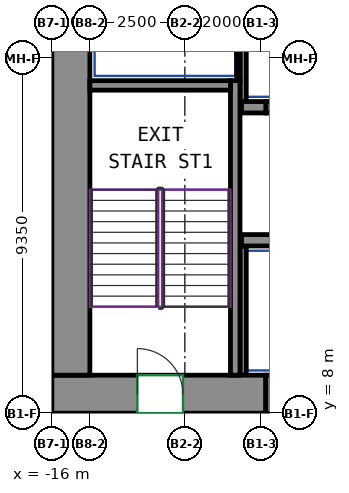
"""IFC4 building model, lengths in metres.
Left out: names, types, materials, properties, quantities, classifications, styles, units other than length and angle.
Written with IfcOpenShell. Run it as: python <this file> out.ifc"""

import sys

from ifc_helpers import new_model, si_unit, direction, frame, frame_2d, origin, place, context, subcontext, project, spatial, rectangle, extrude, source, transform, mapped, element, fill, save


model = new_model("IFC4")
c1 = context("Model", 3, precision=1e-05, world=origin(), true_north=direction((0.0, 1.0)))
c2 = subcontext(c1, "Body", "Model", "MODEL_VIEW")
j1 = project(units=[si_unit("LENGTHUNIT", "METRE"), si_unit("PLANEANGLEUNIT", "RADIAN")], contexts=[c1])
p1 = place(None, origin())
s1 = spatial("IfcSite", under=j1, at=p1, CompositionType="ELEMENT")
p2 = place(p1, origin())
s2 = spatial("IfcBuilding", under=s1, at=p2, CompositionType="ELEMENT")
p3 = place(p2, frame((0.0, 0.0, 75.2)))
s3 = spatial("IfcBuildingStorey", under=s2, at=p3, CompositionType="ELEMENT", Elevation=75.2)
m1 = source(origin(), c2, "Body", "SweptSolid", [
    extrude(rectangle(XDim=5.63, YDim=1.0, at=frame_2d((2.815, 0.0))), origin(), (0.0, 0.0, 1.0), 3.72),
])
p4 = place(p3, frame((-16.0, 8.5, 0.0), z_axis=(0.0, 0.0, 1.0), x_axis=(1.0, 0.0, 0.0)))
e1 = element("IfcWall", 1, at=p4, inside=s3, PredefinedType="SHEAR", context=c2, shape_type="MappedRepresentation", body=[
    mapped(m1, transform((0.0, 0.0, 0.0))),
])
p5 = place(p4, frame((2.25, 0.0, 0.0)))
e2 = element("IfcOpeningElement", 2, at=p5, cuts=e1, PredefinedType="OPENING", context=c2, shape_type="SweptSolid", body=[
    extrude(rectangle(XDim=1.2, YDim=2.1, at=frame_2d((0.6, 1.05))), frame((0.0, 0.51, 0.0), z_axis=(0.0, -1.0, 0.0), x_axis=(1.0, 0.0, 0.0)), (0.0, 0.0, 1.0), 1.02),
])
m2 = source(origin(), c2, "Body", "SweptSolid", [
    extrude(rectangle(XDim=12.0, YDim=1.0, at=frame_2d((6.0, 0.0))), origin(), (0.0, 0.0, 1.0), 3.72),
])
p6 = place(p3, frame((-15.5, 9.0, 0.0), z_axis=(0.0, 0.0, 1.0), x_axis=(0.0, 1.0, 0.0)))
e3 = element("IfcWall", 3, at=p6, inside=s3, PredefinedType="SHEAR", context=c2, shape_type="MappedRepresentation", body=[
    mapped(m2, transform((0.0, 0.0, 0.0))),
])
m3 = source(origin(), c2, "Body", "SweptSolid", [
    extrude(rectangle(XDim=7.75, YDim=0.25, at=frame_2d((3.875, 0.0))), origin(), (0.0, 0.0, 1.0), 3.72),
])
p7 = place(p3, frame((-11.175, 9.0, 0.0), z_axis=(0.0, 0.0, 1.0), x_axis=(0.0, 1.0, 0.0)))
e4 = element("IfcWall", 4, at=p7, inside=s3, PredefinedType="SHEAR", context=c2, shape_type="MappedRepresentation", body=[
    mapped(m3, transform((0.0, 0.0, 0.0))),
])
m4 = source(origin(), c2, "Body", "SweptSolid", [
    extrude(rectangle(XDim=3.7, YDim=0.25, at=frame_2d((1.85, 0.0))), origin(), (0.0, 0.0, 1.0), 3.72),
])
p8 = place(p3, frame((-15.0, 16.625, 0.0), z_axis=(0.0, 0.0, 1.0), x_axis=(1.0, 0.0, 0.0)))
e5 = element("IfcWall", 5, at=p8, inside=s3, PredefinedType="SHEAR", context=c2, shape_type="MappedRepresentation", body=[
    mapped(m4, transform((0.0, 0.0, 0.0))),
])
m5 = source(origin(), c2, "Body", "SweptSolid", [
    extrude(rectangle(XDim=6.0, YDim=0.3, at=frame_2d((3.0, 0.0))), origin(), (0.0, 0.0, 1.0), 3.72),
])
p9 = place(p3, frame((-11.01, 12.55, 0.0), z_axis=(0.0, 0.0, 1.0), x_axis=(1.0, 0.0, 0.0)))
e6 = element("IfcWall", 6, at=p9, inside=s3, PredefinedType="SHEAR", context=c2, shape_type="MappedRepresentation", body=[
    mapped(m5, transform((0.0, 0.0, 0.0))),
])
m6 = source(origin(), c2, "Body", "SweptSolid", [
    extrude(rectangle(XDim=0.64, YDim=0.3, at=frame_2d((0.32, 0.0))), origin(), (0.0, 0.0, 1.0), 3.72),
])
p10 = place(p3, frame((-11.01, 16.05, 0.0), z_axis=(0.0, 0.0, 1.0), x_axis=(1.0, 0.0, 0.0)))
e7 = element("IfcWall", 7, at=p10, inside=s3, PredefinedType="SHEAR", context=c2, shape_type="MappedRepresentation", body=[
    mapped(m6, transform((0.0, 0.0, 0.0))),
])
m7 = source(origin(), c2, "Body", "SweptSolid", [
    extrude(rectangle(XDim=1.4, YDim=0.3, at=frame_2d((0.7, 0.0))), origin(), (0.0, 0.0, 1.0), 3.72),
])
p11 = place(p3, frame((-10.37, 16.05, 0.0), z_axis=(0.0, 0.0, 1.0), x_axis=(1.0, 0.0, 0.0)))
e8 = element("IfcWall", 8, at=p11, inside=s3, PredefinedType="PARTITIONING", context=c2, shape_type="MappedRepresentation", body=[
    mapped(m7, transform((0.0, 0.0, 0.0))),
])
p12 = place(p11, frame((0.15, 0.0, 0.0)))
e9 = element("IfcOpeningElement", 9, at=p12, cuts=e8, PredefinedType="OPENING", context=c2, shape_type="SweptSolid", body=[
    extrude(rectangle(XDim=1.1, YDim=2.1, at=frame_2d((0.55, 1.05))), frame((0.0, 0.16, 0.0), z_axis=(0.0, -1.0, 0.0), x_axis=(1.0, 0.0, 0.0)), (0.0, 0.0, 1.0), 0.32),
])
m8 = source(origin(), c2, "Body", "SweptSolid", [
    extrude(rectangle(XDim=3.275, YDim=0.165, at=frame_2d((1.638, 0.0))), origin(), (0.0, 0.0, 1.0), 3.72),
])
p13 = place(p3, frame((-10.968, 16.2, 0.0), z_axis=(0.0, 0.0, 1.0), x_axis=(0.0, 1.0, 0.0)))
e10 = element("IfcWall", 10, at=p13, inside=s3, PredefinedType="PARTITIONING", context=c2, shape_type="MappedRepresentation", body=[
    mapped(m8, transform((0.0, 0.0, 0.0))),
])
m9 = source(origin(), c2, "Body", "SweptSolid", [
    extrude(rectangle(XDim=2.725, YDim=0.085, at=frame_2d((1.363, 0.0))), origin(), (0.0, 0.0, 1.0), 3.72),
])
p14 = place(p3, frame((-11.093, 16.75, 0.0), z_axis=(0.0, 0.0, 1.0), x_axis=(0.0, 1.0, 0.0)))
e11 = element("IfcWall", 11, at=p14, inside=s3, PredefinedType="PARTITIONING", context=c2, shape_type="MappedRepresentation", body=[
    mapped(m9, transform((0.0, 0.0, 0.0))),
])
m10 = source(origin(), c2, "Body", "SweptSolid", [
    extrude(rectangle(XDim=3.4, YDim=0.165, at=frame_2d((1.7, 0.0))), origin(), (0.0, 0.0, 1.0), 3.72),
])
p15 = place(p3, frame((-10.968, 9.0, 0.0), z_axis=(0.0, 0.0, 1.0), x_axis=(0.0, 1.0, 0.0)))
e12 = element("IfcWall", 12, at=p15, inside=s3, PredefinedType="PARTITIONING", context=c2, shape_type="MappedRepresentation", body=[
    mapped(m10, transform((0.0, 0.0, 0.0))),
])
m11 = source(origin(), c2, "Body", "SweptSolid", [
    extrude(rectangle(XDim=1.4, YDim=1.0, at=frame_2d((0.7, 0.0))), origin(), (0.0, 0.0, 1.0), 2.7),
])
p16 = place(p3, frame((-10.37, 8.5, 0.0), z_axis=(0.0, 0.0, 1.0), x_axis=(1.0, 0.0, 0.0)))
e13 = element("IfcWall", 13, at=p16, inside=s3, PredefinedType="PARTITIONING", context=c2, shape_type="MappedRepresentation", body=[
    mapped(m11, transform((0.0, 0.0, 0.0))),
])
p17 = place(p16, frame((0.25, 0.0, 0.0)))
e14 = element("IfcOpeningElement", 14, at=p17, cuts=e13, PredefinedType="OPENING", context=c2, shape_type="SweptSolid", body=[
    extrude(rectangle(XDim=0.9, YDim=2.1, at=frame_2d((0.45, 1.05))), frame((0.0, 0.51, 0.0), z_axis=(0.0, -1.0, 0.0), x_axis=(1.0, 0.0, 0.0)), (0.0, 0.0, 1.0), 1.02),
])
p18 = place(p5, origin())
e15 = element("IfcDoor", 15, at=p18, inside=s3, OperationType="DOUBLE_DOOR_SINGLE_SWING", PredefinedType="DOOR", context=c2, shape_type="SweptSolid", body=[
    extrude(rectangle(XDim=1.2, YDim=2.1, at=frame_2d((0.6, 1.05))), frame((0.0, 0.405, 0.0), z_axis=(0.0, -1.0, 0.0), x_axis=(1.0, 0.0, 0.0)), (0.0, 0.0, 1.0), 0.05),
])
fill(e2, e15)
save(model, sys.argv[1])
